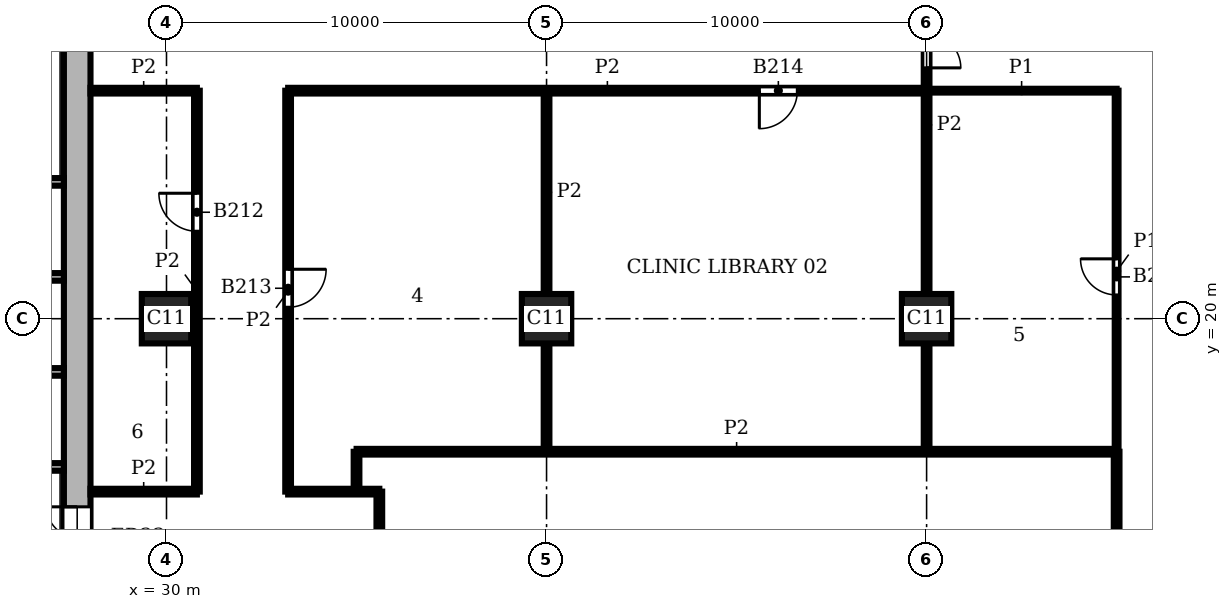
"""IFC4 building model, lengths in metres.
Left out: names, types, materials, properties, quantities, classifications, styles, units other than length and angle.
Written with IfcOpenShell. Run it as: python <this file> out.ifc"""

import sys

from ifc_helpers import new_model, si_unit, direction, frame, frame_2d, origin, origin_2d, place, context, subcontext, project, spatial, rectangle, extrude, element, fill, save


model = new_model("IFC4")
c1 = context("Model", 3, precision=1e-05, world=origin(), true_north=direction((0.0, 1.0)))
c2 = subcontext(c1, "Body", "Model", "MODEL_VIEW")
j1 = project(units=[si_unit("LENGTHUNIT", "METRE"), si_unit("PLANEANGLEUNIT", "RADIAN")], contexts=[c1])
p1 = place(None, origin())
s1 = spatial("IfcSite", under=j1, at=p1, CompositionType="ELEMENT")
p2 = place(p1, origin())
s2 = spatial("IfcBuilding", under=s1, at=p2, CompositionType="ELEMENT")
p3 = place(p2, frame((0.0, 0.0, 143.4)))
s3 = spatial("IfcBuildingStorey", under=s2, at=p3, CompositionType="ELEMENT", Elevation=143.4)
for number, where, z_axis, x_axis in (
    (1, (30.0, 20.0, 0.0), (0.0, 0.0, 1.0), (1.0, 0.0, 0.0)),
    (2, (40.0, 20.0, 0.0), (0.0, 0.0, 1.0), (1.0, 0.0, 0.0)),
    (3, (50.0, 20.0, 0.0), (0.0, 0.0, 1.0), (1.0, 0.0, 0.0)),
):
    element("IfcColumn", number, at=place(p3, frame(where, z_axis=z_axis, x_axis=x_axis)), inside=s3, PredefinedType="COLUMN", context=c2, shape_type="SweptSolid", body=[
        extrude(rectangle(XDim=1.3, YDim=1.3, at=origin_2d()), origin(), (0.0, 0.0, 1.0), 3.9),
    ])
p4 = place(p3, frame((27.65, 8.7, 0.0), z_axis=(0.0, 0.0, 1.0), x_axis=(0.0, 1.0, 0.0)))
e4 = element("IfcWall", 4, at=p4, inside=s3, PredefinedType="SHEAR", context=c2, shape_type="SweptSolid", body=[
    extrude(rectangle(XDim=18.6, YDim=0.7, at=frame_2d((9.3, 0.0))), origin(), (0.0, 0.0, 1.0), 3.9),
])
p5 = place(p4, frame((4.75, 0.0, 0.0)))
e5 = element("IfcOpeningElement", 5, at=p5, cuts=e4, PredefinedType="OPENING", context=c2, shape_type="SweptSolid", body=[
    extrude(rectangle(XDim=1.6, YDim=2.1, at=frame_2d((0.8, 1.05))), frame((0.0, 0.36, 0.0), z_axis=(0.0, -1.0, 0.0), x_axis=(1.0, 0.0, 0.0)), (0.0, 0.0, 1.0), 0.72),
])
for number, where, z_axis, x_axis in (
    (6, (24.3, 16.1, 0.0), (0.0, 0.0, 1.0), (1.0, 0.0, 0.0)),
    (7, (24.3, 18.6, 0.0), (0.0, 0.0, 1.0), (1.0, 0.0, 0.0)),
    (8, (24.3, 21.1, 0.0), (0.0, 0.0, 1.0), (1.0, 0.0, 0.0)),
):
    element("IfcWall", number, at=place(p3, frame(where, z_axis=z_axis, x_axis=x_axis)), inside=s3, PredefinedType="SHEAR", context=c2, shape_type="SweptSolid", body=[
        extrude(rectangle(XDim=3.0, YDim=0.2, at=frame_2d((1.5, 0.0))), origin(), (0.0, 0.0, 1.0), 3.58),
    ])
p6 = place(p3, frame((13.8, 23.6, 0.0), z_axis=(0.0, 0.0, 1.0), x_axis=(1.0, 0.0, 0.0)))
e9 = element("IfcWall", 9, at=p6, inside=s3, PredefinedType="SHEAR", context=c2, shape_type="SweptSolid", body=[
    extrude(rectangle(XDim=13.5, YDim=0.2, at=frame_2d((6.75, 0.0))), origin(), (0.0, 0.0, 1.0), 3.58),
])
p7 = place(p6, frame((2.4, 0.0, 0.0)))
e10 = element("IfcOpeningElement", 10, at=p7, cuts=e9, PredefinedType="OPENING", context=c2, shape_type="SweptSolid", body=[
    extrude(rectangle(XDim=1.1, YDim=2.1, at=frame_2d((0.55, 1.05))), frame((0.0, 0.11, 0.0), z_axis=(0.0, -1.0, 0.0), x_axis=(1.0, 0.0, 0.0)), (0.0, 0.0, 1.0), 0.22),
])
p8 = place(p6, frame((4.9, 0.0, 0.0)))
e11 = element("IfcOpeningElement", 11, at=p8, cuts=e9, PredefinedType="OPENING", context=c2, shape_type="SweptSolid", body=[
    extrude(rectangle(XDim=1.1, YDim=2.1, at=frame_2d((0.55, 1.05))), frame((0.0, 0.11, 0.0), z_axis=(0.0, -1.0, 0.0), x_axis=(1.0, 0.0, 0.0)), (0.0, 0.0, 1.0), 0.22),
])
p9 = place(p6, frame((0.2, 0.0, 0.0)))
e12 = element("IfcOpeningElement", 12, at=p9, cuts=e9, PredefinedType="OPENING", context=c2, shape_type="SweptSolid", body=[
    extrude(rectangle(XDim=1.0, YDim=2.1, at=frame_2d((0.5, 1.05))), frame((0.0, 0.11, 0.0), z_axis=(0.0, -1.0, 0.0), x_axis=(1.0, 0.0, 0.0)), (0.0, 0.0, 1.0), 0.22),
])
p10 = place(p3, frame((55.0, 16.5, 0.0), z_axis=(0.0, 0.0, 1.0), x_axis=(0.0, 1.0, 0.0)))
e13 = element("IfcWall", 13, at=p10, inside=s3, PredefinedType="PARTITIONING", context=c2, shape_type="SweptSolid", body=[
    extrude(rectangle(XDim=9.5, YDim=0.1, at=frame_2d((4.75, 0.0))), origin(), (0.0, 0.0, 1.0), 3.58),
])
p11 = place(p10, frame((4.125, 0.0, 0.0)))
e14 = element("IfcOpeningElement", 14, at=p11, cuts=e13, PredefinedType="OPENING", context=c2, shape_type="SweptSolid", body=[
    extrude(rectangle(XDim=0.95, YDim=2.1, at=frame_2d((0.475, 1.05))), frame((0.0, 0.06, 0.0), z_axis=(0.0, -1.0, 0.0), x_axis=(1.0, 0.0, 0.0)), (0.0, 0.0, 1.0), 0.12),
])
p12 = place(p3, frame((50.0, 26.0, 0.0), z_axis=(0.0, 0.0, 1.0), x_axis=(1.0, 0.0, 0.0)))
e15 = element("IfcWall", 15, at=p12, inside=s3, PredefinedType="PARTITIONING", context=c2, shape_type="SweptSolid", body=[
    extrude(rectangle(XDim=5.0, YDim=0.1, at=frame_2d((2.5, 0.0))), origin(), (0.0, 0.0, 1.0), 3.58),
])
p13 = place(p3, frame((30.8, 15.451, 0.0), z_axis=(0.0, 0.0, 1.0), x_axis=(0.0, 1.0, 0.0)))
e16 = element("IfcWall", 16, at=p13, inside=s3, PredefinedType="PARTITIONING", context=c2, shape_type="SweptSolid", body=[
    extrude(rectangle(XDim=10.548, YDim=0.15, at=frame_2d((5.274, 0.0))), origin(), (0.0, 0.0, 1.0), 3.58),
])
p14 = place(p13, frame((6.85, 0.0, 0.0)))
e17 = element("IfcOpeningElement", 17, at=p14, cuts=e16, PredefinedType="OPENING", context=c2, shape_type="SweptSolid", body=[
    extrude(rectangle(XDim=1.0, YDim=2.1, at=frame_2d((0.5, 1.05))), frame((0.0, 0.085, 0.0), z_axis=(0.0, -1.0, 0.0), x_axis=(1.0, 0.0, 0.0)), (0.0, 0.0, 1.0), 0.17),
])
p15 = place(p3, frame((33.2, 15.451, 0.0), z_axis=(0.0, 0.0, 1.0), x_axis=(0.0, 1.0, 0.0)))
e18 = element("IfcWall", 18, at=p15, inside=s3, PredefinedType="PARTITIONING", context=c2, shape_type="SweptSolid", body=[
    extrude(rectangle(XDim=10.548, YDim=0.15, at=frame_2d((5.274, 0.0))), origin(), (0.0, 0.0, 1.0), 3.58),
])
p16 = place(p15, frame((4.85, 0.0, 0.0)))
e19 = element("IfcOpeningElement", 19, at=p16, cuts=e18, PredefinedType="OPENING", context=c2, shape_type="SweptSolid", body=[
    extrude(rectangle(XDim=1.0, YDim=2.1, at=frame_2d((0.5, 1.05))), frame((0.0, 0.085, 0.0), z_axis=(0.0, -1.0, 0.0), x_axis=(1.0, 0.0, 0.0)), (0.0, 0.0, 1.0), 0.17),
])
p17 = place(p3, frame((35.0, 15.451, 0.0), z_axis=(0.0, 0.0, 1.0), x_axis=(0.0, 1.0, 0.0)))
e20 = element("IfcWall", 20, at=p17, inside=s3, PredefinedType="PARTITIONING", context=c2, shape_type="SweptSolid", body=[
    extrude(rectangle(XDim=1.047, YDim=0.15, at=frame_2d((0.523, 0.0))), origin(), (0.0, 0.0, 1.0), 3.58),
])
p18 = place(p3, frame((35.6, 13.05, 0.0), z_axis=(0.0, 0.0, 1.0), x_axis=(0.0, 1.0, 0.0)))
e21 = element("IfcWall", 21, at=p18, inside=s3, PredefinedType="PARTITIONING", context=c2, shape_type="SweptSolid", body=[
    extrude(rectangle(XDim=2.4, YDim=0.15, at=frame_2d((1.2, 0.0))), origin(), (0.0, 0.0, 1.0), 3.58),
])
p19 = place(p3, frame((40.0, 16.501, 0.0), z_axis=(0.0, 0.0, 1.0), x_axis=(0.0, 1.0, 0.0)))
e22 = element("IfcWall", 22, at=p19, inside=s3, PredefinedType="PARTITIONING", context=c2, shape_type="SweptSolid", body=[
    extrude(rectangle(XDim=2.849, YDim=0.15, at=frame_2d((1.425, 0.0))), origin(), (0.0, 0.0, 1.0), 3.58),
])
p20 = place(p3, frame((40.0, 20.65, 0.0), z_axis=(0.0, 0.0, 1.0), x_axis=(0.0, 1.0, 0.0)))
e23 = element("IfcWall", 23, at=p20, inside=s3, PredefinedType="PARTITIONING", context=c2, shape_type="SweptSolid", body=[
    extrude(rectangle(XDim=5.349, YDim=0.15, at=frame_2d((2.675, 0.0))), origin(), (0.0, 0.0, 1.0), 3.58),
])
p21 = place(p3, frame((50.0, 16.5, 0.0), z_axis=(0.0, 0.0, 1.0), x_axis=(0.0, 1.0, 0.0)))
e24 = element("IfcWall", 24, at=p21, inside=s3, PredefinedType="PARTITIONING", context=c2, shape_type="SweptSolid", body=[
    extrude(rectangle(XDim=2.85, YDim=0.15, at=frame_2d((1.425, 0.0))), origin(), (0.0, 0.0, 1.0), 3.58),
])
p22 = place(p3, frame((50.0, 20.65, 0.0), z_axis=(0.0, 0.0, 1.0), x_axis=(0.0, 1.0, 0.0)))
e25 = element("IfcWall", 25, at=p22, inside=s3, PredefinedType="PARTITIONING", context=c2, shape_type="SweptSolid", body=[
    extrude(rectangle(XDim=8.9, YDim=0.15, at=frame_2d((4.45, 0.0))), origin(), (0.0, 0.0, 1.0), 3.58),
])
p23 = place(p22, frame((5.95, 0.0, 0.0)))
e26 = element("IfcOpeningElement", 26, at=p23, cuts=e25, PredefinedType="OPENING", context=c2, shape_type="SweptSolid", body=[
    extrude(rectangle(XDim=1.8, YDim=2.1, at=frame_2d((0.9, 1.05))), frame((0.0, 0.085, 0.0), z_axis=(0.0, -1.0, 0.0), x_axis=(1.0, 0.0, 0.0)), (0.0, 0.0, 1.0), 0.17),
])
p24 = place(p3, frame((55.0, 4.0, 0.0), z_axis=(0.0, 0.0, 1.0), x_axis=(0.0, 1.0, 0.0)))
e27 = element("IfcWall", 27, at=p24, inside=s3, PredefinedType="PARTITIONING", context=c2, shape_type="SweptSolid", body=[
    extrude(rectangle(XDim=12.5, YDim=0.15, at=frame_2d((6.25, 0.0))), origin(), (0.0, 0.0, 1.0), 3.58),
])
p25 = place(p3, frame((28.0, 15.45, 0.0), z_axis=(0.0, 0.0, 1.0), x_axis=(1.0, 0.0, 0.0)))
e28 = element("IfcWall", 28, at=p25, inside=s3, PredefinedType="PARTITIONING", context=c2, shape_type="SweptSolid", body=[
    extrude(rectangle(XDim=2.799, YDim=0.15, at=frame_2d((1.399, 0.0))), origin(), (0.0, 0.0, 1.0), 3.58),
])
p26 = place(p3, frame((33.201, 15.45, 0.0), z_axis=(0.0, 0.0, 1.0), x_axis=(1.0, 0.0, 0.0)))
e29 = element("IfcWall", 29, at=p26, inside=s3, PredefinedType="PARTITIONING", context=c2, shape_type="SweptSolid", body=[
    extrude(rectangle(XDim=2.399, YDim=0.15, at=frame_2d((1.2, 0.0))), origin(), (0.0, 0.0, 1.0), 3.58),
])
p27 = place(p3, frame((35.002, 16.5, 0.0), z_axis=(0.0, 0.0, 1.0), x_axis=(1.0, 0.0, 0.0)))
e30 = element("IfcWall", 30, at=p27, inside=s3, PredefinedType="PARTITIONING", context=c2, shape_type="SweptSolid", body=[
    extrude(rectangle(XDim=19.998, YDim=0.15, at=frame_2d((9.999, 0.0))), origin(), (0.0, 0.0, 1.0), 3.58),
])
p28 = place(p3, frame((28.0, 26.0, 0.0), z_axis=(0.0, 0.0, 1.0), x_axis=(1.0, 0.0, 0.0)))
e31 = element("IfcWall", 31, at=p28, inside=s3, PredefinedType="PARTITIONING", context=c2, shape_type="SweptSolid", body=[
    extrude(rectangle(XDim=2.799, YDim=0.15, at=frame_2d((1.399, 0.0))), origin(), (0.0, 0.0, 1.0), 3.58),
])
p29 = place(p3, frame((33.201, 26.0, 0.0), z_axis=(0.0, 0.0, 1.0), x_axis=(1.0, 0.0, 0.0)))
e32 = element("IfcWall", 32, at=p29, inside=s3, PredefinedType="PARTITIONING", context=c2, shape_type="SweptSolid", body=[
    extrude(rectangle(XDim=16.799, YDim=0.15, at=frame_2d((8.399, 0.0))), origin(), (0.0, 0.0, 1.0), 3.58),
])
p30 = place(p29, frame((12.398, 0.0, 0.0)))
e33 = element("IfcOpeningElement", 33, at=p30, cuts=e32, PredefinedType="OPENING", context=c2, shape_type="SweptSolid", body=[
    extrude(rectangle(XDim=1.0, YDim=2.1, at=frame_2d((0.5, 1.05))), frame((0.0, 0.085, 0.0), z_axis=(0.0, -1.0, 0.0), x_axis=(1.0, 0.0, 0.0)), (0.0, 0.0, 1.0), 0.17),
])
p31 = place(p5, origin())
e34 = element("IfcDoor", 34, at=p31, inside=s3, OperationType="DOUBLE_DOOR_SINGLE_SWING", PredefinedType="DOOR", context=c2, shape_type="SweptSolid", body=[
    extrude(rectangle(XDim=1.6, YDim=2.1, at=frame_2d((0.8, 1.05))), frame((0.0, 0.025, 0.0), z_axis=(0.0, -1.0, 0.0), x_axis=(1.0, 0.0, 0.0)), (0.0, 0.0, 1.0), 0.05),
])
fill(e5, e34)
p32 = place(p23, frame((1.8, 0.0, 0.0), z_axis=(0.0, 0.0, 1.0), x_axis=(-1.0, 0.0, 0.0)))
e35 = element("IfcDoor", 35, at=p32, inside=s3, OperationType="DOUBLE_DOOR_SINGLE_SWING", PredefinedType="DOOR", context=c2, shape_type="SweptSolid", body=[
    extrude(rectangle(XDim=1.8, YDim=2.1, at=frame_2d((0.9, 1.05))), frame((0.0, 0.025, 0.0), z_axis=(0.0, -1.0, 0.0), x_axis=(1.0, 0.0, 0.0)), (0.0, 0.0, 1.0), 0.05),
])
fill(e26, e35)
p33 = place(p14, origin())
e36 = element("IfcDoor", 36, at=p33, inside=s3, OperationType="SINGLE_SWING_RIGHT", PredefinedType="DOOR", context=c2, shape_type="SweptSolid", body=[
    extrude(rectangle(XDim=1.0, YDim=2.1, at=frame_2d((0.5, 1.05))), frame((0.0, 0.025, 0.0), z_axis=(0.0, -1.0, 0.0), x_axis=(1.0, 0.0, 0.0)), (0.0, 0.0, 1.0), 0.05),
])
fill(e17, e36)
p34 = place(p16, frame((1.0, 0.0, 0.0), z_axis=(0.0, 0.0, 1.0), x_axis=(-1.0, 0.0, 0.0)))
e37 = element("IfcDoor", 37, at=p34, inside=s3, OperationType="SINGLE_SWING_LEFT", PredefinedType="DOOR", context=c2, shape_type="SweptSolid", body=[
    extrude(rectangle(XDim=1.0, YDim=2.1, at=frame_2d((0.5, 1.05))), frame((0.0, 0.025, 0.0), z_axis=(0.0, -1.0, 0.0), x_axis=(1.0, 0.0, 0.0)), (0.0, 0.0, 1.0), 0.05),
])
fill(e19, e37)
p35 = place(p30, frame((1.0, 0.0, 0.0), z_axis=(0.0, 0.0, 1.0), x_axis=(-1.0, 0.0, 0.0)))
e38 = element("IfcDoor", 38, at=p35, inside=s3, OperationType="SINGLE_SWING_RIGHT", PredefinedType="DOOR", context=c2, shape_type="SweptSolid", body=[
    extrude(rectangle(XDim=1.0, YDim=2.1, at=frame_2d((0.5, 1.05))), frame((0.0, 0.025, 0.0), z_axis=(0.0, -1.0, 0.0), x_axis=(1.0, 0.0, 0.0)), (0.0, 0.0, 1.0), 0.05),
])
fill(e33, e38)
p36 = place(p11, origin())
e39 = element("IfcDoor", 39, at=p36, inside=s3, OperationType="SINGLE_SWING_RIGHT", PredefinedType="DOOR", context=c2, shape_type="SweptSolid", body=[
    extrude(rectangle(XDim=0.95, YDim=2.1, at=frame_2d((0.475, 1.05))), frame((0.0, 0.025, 0.0), z_axis=(0.0, -1.0, 0.0), x_axis=(1.0, 0.0, 0.0)), (0.0, 0.0, 1.0), 0.05),
])
fill(e14, e39)
save(model, sys.argv[1])
